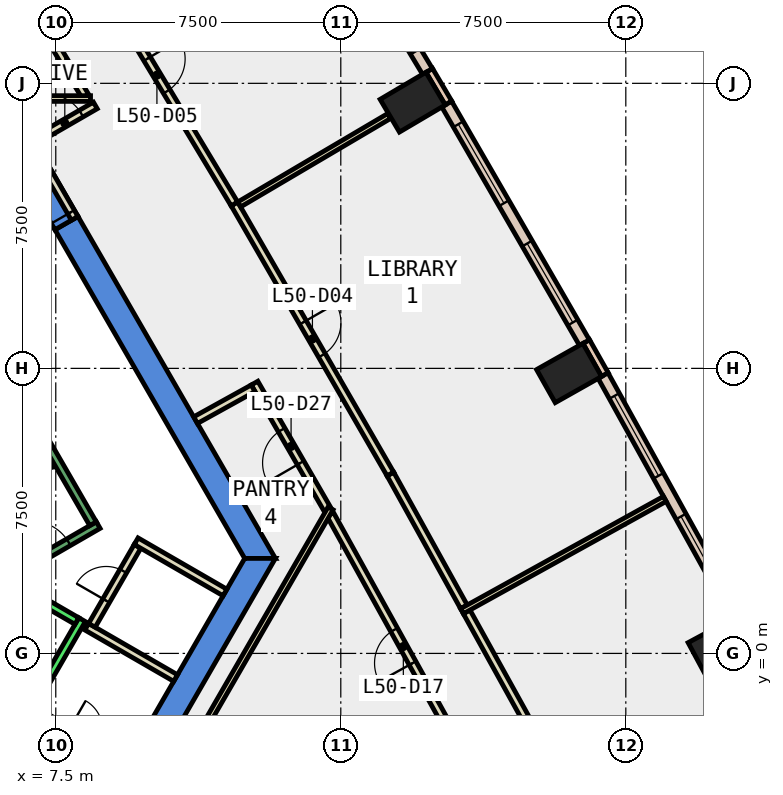
"""IFC4 building model, lengths in metres.
Left out: names, types, materials, properties, quantities, classifications, styles, units other than length and angle.
Written with IfcOpenShell. Run it as: python <this file> out.ifc"""

import sys

from ifc_helpers import new_model, si_unit, direction, frame, frame_2d, origin, origin_2d, place, context, subcontext, project, spatial, polyline, rectangle, outline, extrude, element, fill, save


model = new_model("IFC4")
c1 = context("Model", 3, precision=1e-05, world=origin(), true_north=direction((0.0, 1.0)))
c2 = subcontext(c1, "Body", "Model", "MODEL_VIEW")
j1 = project(units=[si_unit("LENGTHUNIT", "METRE"), si_unit("PLANEANGLEUNIT", "RADIAN")], contexts=[c1])
p1 = place(None, origin())
s1 = spatial("IfcSite", under=j1, at=p1, CompositionType="ELEMENT")
p2 = place(p1, origin())
s2 = spatial("IfcBuilding", under=s1, at=p2, CompositionType="ELEMENT")
p3 = place(p2, frame((0.0, 0.0, 223.4)))
s3 = spatial("IfcBuildingStorey", under=s2, at=p3, CompositionType="ELEMENT", Elevation=223.4)
for number, where, z_axis, x_axis in (
    (1, (24.993, 0.175, -0.4), (0.0, 0.0, 1.0), (-0.474, 0.88, 0.0)),
    (2, (21.007, 7.377, -0.4), (0.0, 0.0, 1.0), (-0.491, 0.871, 0.0)),
    (3, (16.892, 14.504, -0.4), (0.0, 0.0, 1.0), (-0.509, 0.861, 0.0)),
):
    element("IfcColumn", number, at=place(p3, frame(where, z_axis=z_axis, x_axis=x_axis)), inside=s3, PredefinedType="COLUMN", context=c2, shape_type="SweptSolid", body=[
        extrude(rectangle(XDim=1.0, YDim=1.4, at=origin_2d()), origin(), (0.0, 0.0, 1.0), 4.2),
    ])
p4 = place(p3, frame((0.0, 0.0, -0.4)))
e4 = element("IfcWall", 4, at=p4, inside=s3, PredefinedType="SHEAR", context=c2, shape_type="SweptSolid", body=[
    extrude(outline(polyline([(8.084, 11.498), (7.478, 11.148), (12.471, 2.5), (13.279, 2.5), (8.084, 11.498)])), origin(), (0.0, 0.0, 1.0), 4.2),
])
p5 = place(p3, frame((0.0, 0.0, 3.6)))
e5 = element("IfcWall", 5, at=p5, inside=s3, PredefinedType="SHEAR", context=c2, shape_type="SweptSolid", body=[
    extrude(outline(polyline([(7.084, 13.23), (6.478, 12.88), (7.478, 11.148), (8.084, 11.498), (7.084, 13.23)])), origin(), (0.0, 0.0, 1.0), 0.2),
])
p6 = place(p3, frame((0.0, 0.0, -0.4)))
e6 = element("IfcWall", 6, at=p6, inside=s3, PredefinedType="SHEAR", context=c2, shape_type="SweptSolid", body=[
    extrude(outline(polyline([(6.64, -9.0), (13.279, 2.5), (12.471, 2.5), (6.235, -8.3), (6.64, -9.0)])), origin(), (0.0, 0.0, 1.0), 4.2),
])
p7 = place(p3, frame((21.95, 7.334, 0.0), z_axis=(0.0, 0.0, 1.0), x_axis=(-0.491743606947, 0.87074004446, 0.0)))
e7 = element("IfcWall", 7, at=p7, inside=s3, PredefinedType="STANDARD", context=c2, shape_type="SweptSolid", body=[
    extrude(rectangle(XDim=1.0, YDim=0.2, at=frame_2d((0.5, 0.0))), origin(), (0.0, 0.0, 1.0), 3.8),
])
p8 = place(p3, frame((17.835, 14.481, 0.0), z_axis=(0.0, 0.0, 1.0), x_axis=(-0.508161541526, 0.861261776531, 0.0)))
e8 = element("IfcWall", 8, at=p8, inside=s3, PredefinedType="STANDARD", context=c2, shape_type="SweptSolid", body=[
    extrude(rectangle(XDim=1.0, YDim=0.2, at=frame_2d((0.5, 0.0))), origin(), (0.0, 0.0, 1.0), 3.8),
])
p9 = place(p3, frame((25.411, 0.968, 0.0), z_axis=(0.0, 0.0, 1.0), x_axis=(-0.484163461668, 0.87497756679, 0.0)))
e9 = element("IfcWall", 9, at=p9, inside=s3, PredefinedType="STANDARD", context=c2, shape_type="SweptSolid", body=[
    extrude(rectangle(XDim=7.247, YDim=0.3, at=frame_2d((3.624, 0.0))), origin(), (0.0, 0.0, 1.0), 3.8),
])
p10 = place(p9, frame((0.612, 0.0, 0.9)))
e10 = element("IfcOpeningElement", 10, at=p10, cuts=e9, PredefinedType="OPENING", context=c2, shape_type="SweptSolid", body=[
    extrude(rectangle(XDim=2.4, YDim=2.6, at=frame_2d((1.2, 1.3))), frame((0.0, 0.16, 0.0), z_axis=(0.0, -1.0, 0.0), x_axis=(1.0, 0.0, 0.0)), (0.0, 0.0, 1.0), 0.32),
])
p11 = place(p9, frame((4.235, 0.0, 0.9)))
e11 = element("IfcOpeningElement", 11, at=p11, cuts=e9, PredefinedType="OPENING", context=c2, shape_type="SweptSolid", body=[
    extrude(rectangle(XDim=2.4, YDim=2.6, at=frame_2d((1.2, 1.3))), frame((0.0, 0.16, 0.0), z_axis=(0.0, -1.0, 0.0), x_axis=(1.0, 0.0, 0.0)), (0.0, 0.0, 1.0), 0.32),
])
p12 = place(p3, frame((21.411, 8.177, 0.0), z_axis=(0.0, 0.0, 1.0), x_axis=(-0.499968351115, 0.866043675505, 0.0)))
e12 = element("IfcWall", 12, at=p12, inside=s3, PredefinedType="STANDARD", context=c2, shape_type="SweptSolid", body=[
    extrude(rectangle(XDim=7.248, YDim=0.3, at=frame_2d((3.624, 0.0))), origin(), (0.0, 0.0, 1.0), 3.8),
])
p13 = place(p12, frame((0.612, 0.0, 0.9)))
e13 = element("IfcOpeningElement", 13, at=p13, cuts=e12, PredefinedType="OPENING", context=c2, shape_type="SweptSolid", body=[
    extrude(rectangle(XDim=2.4, YDim=2.6, at=frame_2d((1.2, 1.3))), frame((0.0, 0.16, 0.0), z_axis=(0.0, -1.0, 0.0), x_axis=(1.0, 0.0, 0.0)), (0.0, 0.0, 1.0), 0.32),
])
p14 = place(p12, frame((4.236, 0.0, 0.9)))
e14 = element("IfcOpeningElement", 14, at=p14, cuts=e12, PredefinedType="OPENING", context=c2, shape_type="SweptSolid", body=[
    extrude(rectangle(XDim=2.4, YDim=2.6, at=frame_2d((1.2, 1.3))), frame((0.0, 0.16, 0.0), z_axis=(0.0, -1.0, 0.0), x_axis=(1.0, 0.0, 0.0)), (0.0, 0.0, 1.0), 0.32),
])
p15 = place(p3, frame((17.281, 15.313, 0.0), z_axis=(0.0, 0.0, 1.0), x_axis=(-0.515560283412, 0.856853309597, 0.0)))
e15 = element("IfcWall", 15, at=p15, inside=s3, PredefinedType="STANDARD", context=c2, shape_type="SweptSolid", body=[
    extrude(rectangle(XDim=7.249, YDim=0.3, at=frame_2d((3.624, 0.0))), origin(), (0.0, 0.0, 1.0), 3.8),
])
p16 = place(p15, frame((0.612, 0.0, 0.9)))
e16 = element("IfcOpeningElement", 16, at=p16, cuts=e15, PredefinedType="OPENING", context=c2, shape_type="SweptSolid", body=[
    extrude(rectangle(XDim=2.4, YDim=2.6, at=frame_2d((1.2, 1.3))), frame((0.0, 0.16, 0.0), z_axis=(0.0, -1.0, 0.0), x_axis=(1.0, 0.0, 0.0)), (0.0, 0.0, 1.0), 0.32),
])
p17 = place(p15, frame((4.236, 0.0, 0.9)))
e17 = element("IfcOpeningElement", 17, at=p17, cuts=e15, PredefinedType="OPENING", context=c2, shape_type="SweptSolid", body=[
    extrude(rectangle(XDim=2.4, YDim=2.6, at=frame_2d((1.2, 1.3))), frame((0.0, 0.16, 0.0), z_axis=(0.0, -1.0, 0.0), x_axis=(1.0, 0.0, 0.0)), (0.0, 0.0, 1.0), 0.32),
])
p18 = place(p3, frame((14.652, 3.783, 0.0), z_axis=(0.0, 0.0, 1.0), x_axis=(-0.499821427992, 0.866128477837, 0.0)))
e18 = element("IfcWall", 18, at=p18, inside=s3, PredefinedType="PARTITIONING", context=c2, shape_type="SweptSolid", body=[
    extrude(rectangle(XDim=3.844, YDim=0.2, at=frame_2d((1.922, 0.0))), origin(), (0.0, 0.0, 1.0), 3.8),
])
p19 = place(p18, frame((1.421, 0.0, 0.0)))
e19 = element("IfcOpeningElement", 19, at=p19, cuts=e18, PredefinedType="OPENING", context=c2, shape_type="SweptSolid", body=[
    extrude(rectangle(XDim=1.0, YDim=2.1, at=frame_2d((0.5, 1.05))), frame((0.0, 0.11, 0.0), z_axis=(0.0, -1.0, 0.0), x_axis=(1.0, 0.0, 0.0)), (0.0, 0.0, 1.0), 0.22),
])
p20 = place(p3, frame((12.693, 6.976, 0.0), z_axis=(0.0, 0.0, 1.0), x_axis=(-0.874908151187, -0.484288887944, 0.0)))
e20 = element("IfcWall", 20, at=p20, inside=s3, PredefinedType="PARTITIONING", context=c2, shape_type="SweptSolid", body=[
    extrude(rectangle(XDim=1.731, YDim=0.2, at=frame_2d((0.865, 0.0))), origin(), (0.0, 0.0, 1.0), 3.8),
])
p21 = place(p3, frame((8.276, 14.664, 0.0), z_axis=(0.0, 0.0, 1.0), x_axis=(-0.515416266777, 0.85693994652, 0.0)))
e21 = element("IfcWall", 21, at=p21, inside=s3, PredefinedType="PARTITIONING", context=c2, shape_type="SweptSolid", body=[
    extrude(rectangle(XDim=3.587, YDim=0.2, at=frame_2d((1.793, 0.0))), origin(), (0.0, 0.0, 1.0), 3.8),
])
p22 = place(p3, frame((18.574, -3.303, 0.0), z_axis=(0.0, 0.0, 1.0), x_axis=(-0.484239190765, 0.874935658279, 0.0)))
e22 = element("IfcWall", 22, at=p22, inside=s3, PredefinedType="PARTITIONING", context=c2, shape_type="SweptSolid", body=[
    extrude(rectangle(XDim=7.963, YDim=0.2, at=frame_2d((3.981, 0.0))), origin(), (0.0, 0.0, 1.0), 3.8),
])
p23 = place(p22, frame((3.482, 0.0, 0.0)))
e23 = element("IfcOpeningElement", 23, at=p23, cuts=e22, PredefinedType="OPENING", context=c2, shape_type="SweptSolid", body=[
    extrude(rectangle(XDim=1.0, YDim=2.1, at=frame_2d((0.5, 1.05))), frame((0.0, 0.11, 0.0), z_axis=(0.0, -1.0, 0.0), x_axis=(1.0, 0.0, 0.0)), (0.0, 0.0, 1.0), 0.22),
])
p24 = place(p3, frame((18.312, 1.094, 0.0), z_axis=(0.0, 0.0, 1.0), x_axis=(0.484328424129, -0.874886265511, 0.0)))
e24 = element("IfcWall", 24, at=p24, inside=s3, PredefinedType="PARTITIONING", context=c2, shape_type="SweptSolid", body=[
    extrude(rectangle(XDim=3.991, YDim=0.2, at=frame_2d((1.996, 0.0))), origin(), (0.0, 0.0, 1.0), 3.8),
])
p25 = place(p3, frame((12.202, 11.828, 0.0), z_axis=(0.0, 0.0, 1.0), x_axis=(0.499919823193, -0.866071688937, 0.0)))
e25 = element("IfcWall", 25, at=p25, inside=s3, PredefinedType="PARTITIONING", context=c2, shape_type="SweptSolid", body=[
    extrude(rectangle(XDim=8.209, YDim=0.2, at=frame_2d((4.104, 0.0))), origin(), (0.0, 0.0, 1.0), 3.8),
])
p26 = place(p25, frame((3.604, 0.0, 0.0)))
e26 = element("IfcOpeningElement", 26, at=p26, cuts=e25, PredefinedType="OPENING", context=c2, shape_type="SweptSolid", body=[
    extrude(rectangle(XDim=1.0, YDim=2.1, at=frame_2d((0.5, 1.05))), frame((0.0, 0.11, 0.0), z_axis=(0.0, -1.0, 0.0), x_axis=(1.0, 0.0, 0.0)), (0.0, 0.0, 1.0), 0.22),
])
p27 = place(p3, frame((16.306, 4.718, 0.0), z_axis=(0.0, 0.0, 1.0), x_axis=(0.484411997038, -0.874839995156, 0.0)))
e27 = element("IfcWall", 27, at=p27, inside=s3, PredefinedType="PARTITIONING", context=c2, shape_type="SweptSolid", body=[
    extrude(rectangle(XDim=3.993, YDim=0.2, at=frame_2d((1.996, 0.0))), origin(), (0.0, 0.0, 1.0), 3.8),
])
p28 = place(p3, frame((8.046, 18.732, 0.0), z_axis=(0.0, 0.0, 1.0), x_axis=(0.515502328211, -0.856888178007, 0.0)))
e28 = element("IfcWall", 28, at=p28, inside=s3, PredefinedType="PARTITIONING", context=c2, shape_type="SweptSolid", body=[
    extrude(rectangle(XDim=8.058, YDim=0.2, at=frame_2d((4.029, 0.0))), origin(), (0.0, 0.0, 1.0), 3.8),
])
p29 = place(p28, frame((3.604, 0.0, 0.0)))
e29 = element("IfcOpeningElement", 29, at=p29, cuts=e28, PredefinedType="OPENING", context=c2, shape_type="SweptSolid", body=[
    extrude(rectangle(XDim=1.0, YDim=2.1, at=frame_2d((0.5, 1.05))), frame((0.0, 0.11, 0.0), z_axis=(0.0, -1.0, 0.0), x_axis=(1.0, 0.0, 0.0)), (0.0, 0.0, 1.0), 0.22),
])
p30 = place(p3, frame((6.841, -1.451, 0.0), z_axis=(0.0, 0.0, 1.0), x_axis=(0.866220623736, -0.499661716578, 0.0)))
e30 = element("IfcWall", 30, at=p30, inside=s3, PredefinedType="PARTITIONING", context=c2, shape_type="SweptSolid", body=[
    extrude(rectangle(XDim=2.9, YDim=0.2, at=frame_2d((1.45, 0.0))), origin(), (0.0, 0.0, 1.0), 3.8),
])
p31 = place(p30, frame((1.15, 0.0, 0.0)))
e31 = element("IfcOpeningElement", 31, at=p31, cuts=e30, PredefinedType="OPENING", context=c2, shape_type="SweptSolid", body=[
    extrude(rectangle(XDim=0.9, YDim=2.1, at=frame_2d((0.45, 1.05))), frame((0.0, 0.11, 0.0), z_axis=(0.0, -1.0, 0.0), x_axis=(1.0, 0.0, 0.0)), (0.0, 0.0, 1.0), 0.22),
])
p32 = place(p3, frame((10.653, -0.648, 0.0), z_axis=(0.0, 0.0, 1.0), x_axis=(-0.866036505625, 0.499980770555, 0.0)))
e32 = element("IfcWall", 32, at=p32, inside=s3, PredefinedType="PARTITIONING", context=c2, shape_type="SweptSolid", body=[
    extrude(rectangle(XDim=2.7, YDim=0.2, at=frame_2d((1.35, 0.0))), origin(), (0.0, 0.0, 1.0), 3.8),
])
p33 = place(p3, frame((8.451, 0.738, 0.0), z_axis=(0.0, 0.0, 1.0), x_axis=(0.499913221443, 0.866075499611, 0.0)))
e33 = element("IfcWall", 33, at=p33, inside=s3, PredefinedType="PARTITIONING", context=c2, shape_type="SweptSolid", body=[
    extrude(rectangle(XDim=2.4, YDim=0.2, at=frame_2d((1.2, 0.0))), origin(), (0.0, 0.0, 1.0), 3.8),
])
p34 = place(p33, frame((0.75, 0.0, 0.0)))
e34 = element("IfcOpeningElement", 34, at=p34, cuts=e33, PredefinedType="OPENING", context=c2, shape_type="SweptSolid", body=[
    extrude(rectangle(XDim=0.9, YDim=2.1, at=frame_2d((0.45, 1.05))), frame((0.0, 0.11, 0.0), z_axis=(0.0, -1.0, 0.0), x_axis=(1.0, 0.0, 0.0)), (0.0, 0.0, 1.0), 0.22),
])
p35 = place(p3, frame((9.615, 2.953, 0.0), z_axis=(0.0, 0.0, 1.0), x_axis=(0.866013897511, -0.50001992892, 0.0)))
e35 = element("IfcWall", 35, at=p35, inside=s3, PredefinedType="PARTITIONING", context=c2, shape_type="SweptSolid", body=[
    extrude(rectangle(XDim=2.7, YDim=0.2, at=frame_2d((1.35, 0.0))), origin(), (0.0, 0.0, 1.0), 3.8),
])
p36 = place(p3, frame((8.415, 14.6, 0.0), z_axis=(0.0, 0.0, 1.0), x_axis=(-1.0, 0.0, 0.0)))
e36 = element("IfcWall", 36, at=p36, inside=s3, PredefinedType="PARTITIONING", context=c2, shape_type="SweptSolid", body=[
    extrude(rectangle(XDim=8.015, YDim=0.15, at=frame_2d((4.008, 0.0))), origin(), (0.0, 0.0, 1.0), 3.8),
])
p37 = place(p3, frame((9.779, -4.762, 0.0), z_axis=(0.0, 0.0, 1.0), x_axis=(0.499990552429, 0.866030858274, 0.0)))
e37 = element("IfcWall", 37, at=p37, inside=s3, PredefinedType="PARTITIONING", context=c2, shape_type="SweptSolid", body=[
    extrude(rectangle(XDim=9.906, YDim=0.15, at=frame_2d((4.953, 0.0))), origin(), (0.0, 0.0, 1.0), 3.8),
])
p38 = place(p3, frame((18.189, 1.111, 0.0), z_axis=(0.0, 0.0, 1.0), x_axis=(0.874928335558, 0.484252421405, 0.0)))
e38 = element("IfcWall", 38, at=p38, inside=s3, PredefinedType="PARTITIONING", context=c2, shape_type="SweptSolid", body=[
    extrude(rectangle(XDim=6.1, YDim=0.15, at=frame_2d((3.05, 0.0))), origin(), (0.0, 0.0, 1.0), 3.8),
])
p39 = place(p3, frame((12.326, 11.813, 0.0), z_axis=(0.0, 0.0, 1.0), x_axis=(0.861428100003, 0.507879541353, 0.0)))
e39 = element("IfcWall", 39, at=p39, inside=s3, PredefinedType="PARTITIONING", context=c2, shape_type="SweptSolid", body=[
    extrude(rectangle(XDim=4.58, YDim=0.15, at=frame_2d((2.29, 0.0))), origin(), (0.0, 0.0, 1.0), 3.8),
])
p40 = place(p3, frame((7.997, 11.448, 0.0), z_axis=(0.0, 0.0, 1.0), x_axis=(-0.50002537861, 0.866010750942, 0.0)))
e40 = element("IfcWall", 40, at=p40, inside=s3, PredefinedType="PARTITIONING", context=c2, shape_type="SweptSolid", body=[
    extrude(rectangle(XDim=2.0, YDim=0.2, at=frame_2d((1.0, 0.0))), origin(), (0.0, 0.0, 1.0), 2.4),
])
p41 = place(p40, frame((0.19, 0.0, 0.0)))
e41 = element("IfcOpeningElement", 41, at=p41, cuts=e40, PredefinedType="OPENING", context=c2, shape_type="SweptSolid", body=[
    extrude(rectangle(XDim=1.8, YDim=2.1, at=frame_2d((0.9, 1.05))), frame((0.0, 0.11, 0.0), z_axis=(0.0, -1.0, 0.0), x_axis=(1.0, 0.0, 0.0)), (0.0, 0.0, 1.0), 0.22),
])
p42 = place(p3, frame((7.237, 13.665, 0.0), z_axis=(0.0, 0.0, 1.0), x_axis=(0.865999269783, 0.500045262687, 0.0)))
e42 = element("IfcWall", 42, at=p42, inside=s3, PredefinedType="PARTITIONING", context=c2, shape_type="SweptSolid", body=[
    extrude(rectangle(XDim=1.506, YDim=0.2, at=frame_2d((0.753, 0.0))), origin(), (0.0, 0.0, 1.0), 3.8),
])
p43 = place(p42, frame((0.078, 0.0, 0.0)))
e43 = element("IfcOpeningElement", 43, at=p43, cuts=e42, PredefinedType="OPENING", context=c2, shape_type="SweptSolid", body=[
    extrude(rectangle(XDim=1.0, YDim=2.1, at=frame_2d((0.5, 1.05))), frame((0.0, 0.11, 0.0), z_axis=(0.0, -1.0, 0.0), x_axis=(1.0, 0.0, 0.0)), (0.0, 0.0, 1.0), 0.22),
])
p44 = place(p3, frame((5.492, -3.788, 0.0), z_axis=(0.0, 0.0, 1.0), x_axis=(0.500034260056, 0.866005622828, 0.0)))
e44 = element("IfcWall", 44, at=p44, inside=s3, PredefinedType="STANDARD", context=c2, shape_type="SweptSolid", body=[
    extrude(rectangle(XDim=5.399, YDim=0.2, at=frame_2d((2.7, 0.0))), origin(), (0.0, 0.0, 1.0), 3.8),
])
p45 = place(p3, frame((5.977, 2.052, 0.0), z_axis=(0.0, 0.0, 1.0), x_axis=(0.865973769406, -0.500089422704, 0.0)))
e45 = element("IfcWall", 45, at=p45, inside=s3, PredefinedType="STANDARD", context=c2, shape_type="SweptSolid", body=[
    extrude(rectangle(XDim=2.399, YDim=0.2, at=frame_2d((1.2, 0.0))), origin(), (0.0, 0.0, 1.0), 3.8),
])
p46 = place(p3, frame((4.806, 1.176, 0.0), z_axis=(0.0, 0.0, 1.0), x_axis=(0.866059941101, 0.499940174841, 0.0)))
e46 = element("IfcWall", 46, at=p46, inside=s3, PredefinedType="STANDARD", context=c2, shape_type="SweptSolid", body=[
    extrude(rectangle(XDim=4.4, YDim=0.2, at=frame_2d((2.2, 0.0))), origin(), (0.0, 0.0, 1.0), 3.8),
])
p47 = place(p46, frame((2.4, 0.0, 0.0)))
e47 = element("IfcOpeningElement", 47, at=p47, cuts=e46, PredefinedType="OPENING", context=c2, shape_type="SweptSolid", body=[
    extrude(rectangle(XDim=1.1, YDim=2.2, at=frame_2d((0.55, 1.1))), frame((0.0, 0.11, 0.0), z_axis=(0.0, -1.0, 0.0), x_axis=(1.0, 0.0, 0.0)), (0.0, 0.0, 1.0), 0.22),
])
p48 = place(p3, frame((8.48, 3.412, 0.0), z_axis=(0.0, 0.0, 1.0), x_axis=(-0.499978703459, 0.866037698999, 0.0)))
e48 = element("IfcWall", 48, at=p48, inside=s3, PredefinedType="STANDARD", context=c2, shape_type="SweptSolid", body=[
    extrude(rectangle(XDim=6.9, YDim=0.2, at=frame_2d((3.45, 0.0))), origin(), (0.0, 0.0, 1.0), 3.8),
])
p49 = place(p10, origin())
e49 = element("IfcWindow", 49, at=p49, inside=s3, PartitioningType="SINGLE_PANEL", PredefinedType="WINDOW", context=c2, shape_type="SweptSolid", body=[
    extrude(rectangle(XDim=2.4, YDim=2.6, at=frame_2d((1.2, 1.3))), frame((0.0, 0.03, 0.0), z_axis=(0.0, -1.0, 0.0), x_axis=(1.0, 0.0, 0.0)), (0.0, 0.0, 1.0), 0.06),
])
fill(e10, e49)
p50 = place(p11, origin())
e50 = element("IfcWindow", 50, at=p50, inside=s3, PartitioningType="SINGLE_PANEL", PredefinedType="WINDOW", context=c2, shape_type="SweptSolid", body=[
    extrude(rectangle(XDim=2.4, YDim=2.6, at=frame_2d((1.2, 1.3))), frame((0.0, 0.03, 0.0), z_axis=(0.0, -1.0, 0.0), x_axis=(1.0, 0.0, 0.0)), (0.0, 0.0, 1.0), 0.06),
])
fill(e11, e50)
p51 = place(p13, origin())
e51 = element("IfcWindow", 51, at=p51, inside=s3, PartitioningType="SINGLE_PANEL", PredefinedType="WINDOW", context=c2, shape_type="SweptSolid", body=[
    extrude(rectangle(XDim=2.4, YDim=2.6, at=frame_2d((1.2, 1.3))), frame((0.0, 0.03, 0.0), z_axis=(0.0, -1.0, 0.0), x_axis=(1.0, 0.0, 0.0)), (0.0, 0.0, 1.0), 0.06),
])
fill(e13, e51)
p52 = place(p14, origin())
e52 = element("IfcWindow", 52, at=p52, inside=s3, PartitioningType="SINGLE_PANEL", PredefinedType="WINDOW", context=c2, shape_type="SweptSolid", body=[
    extrude(rectangle(XDim=2.4, YDim=2.6, at=frame_2d((1.2, 1.3))), frame((0.0, 0.03, 0.0), z_axis=(0.0, -1.0, 0.0), x_axis=(1.0, 0.0, 0.0)), (0.0, 0.0, 1.0), 0.06),
])
fill(e14, e52)
p53 = place(p26, origin())
e53 = element("IfcDoor", 53, at=p53, inside=s3, OperationType="SINGLE_SWING_RIGHT", PredefinedType="DOOR", context=c2, shape_type="SweptSolid", body=[
    extrude(rectangle(XDim=1.0, YDim=2.1, at=frame_2d((0.5, 1.05))), frame((0.0, 0.025, 0.0), z_axis=(0.0, -1.0, 0.0), x_axis=(1.0, 0.0, 0.0)), (0.0, 0.0, 1.0), 0.05),
])
fill(e26, e53)
p54 = place(p29, origin())
e54 = element("IfcDoor", 54, at=p54, inside=s3, OperationType="SINGLE_SWING_RIGHT", PredefinedType="DOOR", context=c2, shape_type="SweptSolid", body=[
    extrude(rectangle(XDim=1.0, YDim=2.1, at=frame_2d((0.5, 1.05))), frame((0.0, 0.025, 0.0), z_axis=(0.0, -1.0, 0.0), x_axis=(1.0, 0.0, 0.0)), (0.0, 0.0, 1.0), 0.05),
])
fill(e29, e54)
p55 = place(p23, origin())
e55 = element("IfcDoor", 55, at=p55, inside=s3, OperationType="SINGLE_SWING_LEFT", PredefinedType="DOOR", context=c2, shape_type="SweptSolid", body=[
    extrude(rectangle(XDim=1.0, YDim=2.1, at=frame_2d((0.5, 1.05))), frame((0.0, 0.025, 0.0), z_axis=(0.0, -1.0, 0.0), x_axis=(1.0, 0.0, 0.0)), (0.0, 0.0, 1.0), 0.05),
])
fill(e23, e55)
p56 = place(p43, origin())
e56 = element("IfcDoor", 56, at=p56, inside=s3, OperationType="SINGLE_SWING_LEFT", PredefinedType="DOOR", context=c2, shape_type="SweptSolid", body=[
    extrude(rectangle(XDim=1.0, YDim=2.1, at=frame_2d((0.5, 1.05))), frame((0.0, 0.025, 0.0), z_axis=(0.0, -1.0, 0.0), x_axis=(1.0, 0.0, 0.0)), (0.0, 0.0, 1.0), 0.05),
])
fill(e43, e56)
p57 = place(p19, origin())
e57 = element("IfcDoor", 57, at=p57, inside=s3, OperationType="SINGLE_SWING_LEFT", PredefinedType="DOOR", context=c2, shape_type="SweptSolid", body=[
    extrude(rectangle(XDim=1.0, YDim=2.1, at=frame_2d((0.5, 1.05))), frame((0.0, 0.025, 0.0), z_axis=(0.0, -1.0, 0.0), x_axis=(1.0, 0.0, 0.0)), (0.0, 0.0, 1.0), 0.05),
])
fill(e19, e57)
p58 = place(p34, origin())
e58 = element("IfcDoor", 58, at=p58, inside=s3, OperationType="SINGLE_SWING_LEFT", PredefinedType="DOOR", context=c2, shape_type="SweptSolid", body=[
    extrude(rectangle(XDim=0.9, YDim=2.1, at=frame_2d((0.45, 1.05))), frame((0.0, 0.025, 0.0), z_axis=(0.0, -1.0, 0.0), x_axis=(1.0, 0.0, 0.0)), (0.0, 0.0, 1.0), 0.05),
])
fill(e34, e58)
p59 = place(p41, origin())
e59 = element("IfcDoor", 59, at=p59, inside=s3, OperationType="DOUBLE_DOOR_SINGLE_SWING", PredefinedType="DOOR", context=c2, shape_type="SweptSolid", body=[
    extrude(rectangle(XDim=1.8, YDim=2.1, at=frame_2d((0.9, 1.05))), frame((0.0, 0.025, 0.0), z_axis=(0.0, -1.0, 0.0), x_axis=(1.0, 0.0, 0.0)), (0.0, 0.0, 1.0), 0.05),
])
fill(e41, e59)
p60 = place(p47, origin())
e60 = element("IfcDoor", 60, at=p60, inside=s3, OperationType="SINGLE_SWING_LEFT", PredefinedType="DOOR", context=c2, shape_type="SweptSolid", body=[
    extrude(rectangle(XDim=1.1, YDim=2.2, at=frame_2d((0.55, 1.1))), frame((0.0, 0.025, 0.0), z_axis=(0.0, -1.0, 0.0), x_axis=(1.0, 0.0, 0.0)), (0.0, 0.0, 1.0), 0.05),
])
fill(e47, e60)
save(model, sys.argv[1])
